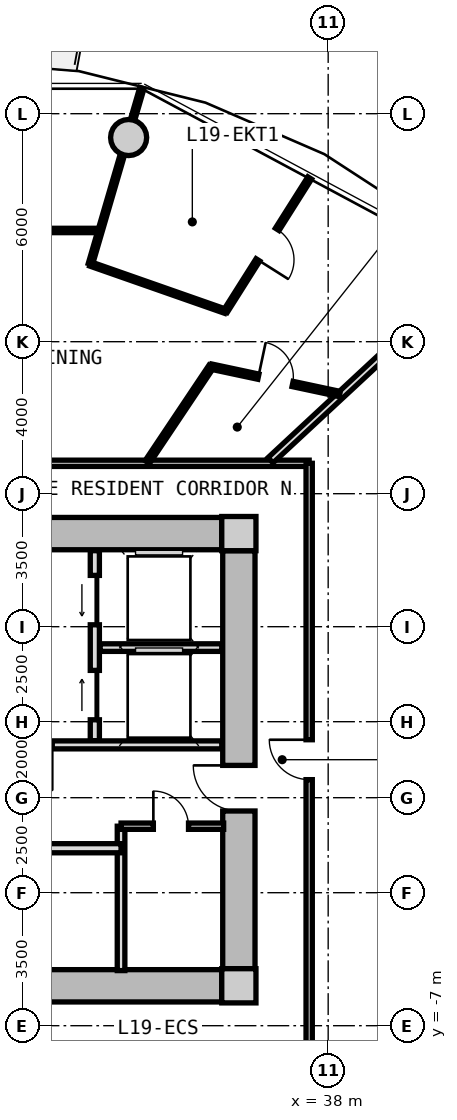
"""IFC4 building model, lengths in metres.
Left out: names, types, materials, properties, quantities, classifications, styles, units other than length and angle.
Written with IfcOpenShell. Run it as: python <this file> out.ifc"""

import sys

from ifc_helpers import new_model, si_unit, direction, frame, frame_2d, origin, origin_2d, place, context, subcontext, project, spatial, rectangle, circle, extrude, source, transform, mapped, element, fill, save


model = new_model("IFC4")
c1 = context("Model", 3, precision=1e-05, world=origin(), true_north=direction((0.0, 1.0)))
c2 = subcontext(c1, "Body", "Model", "MODEL_VIEW")
j1 = project(units=[si_unit("LENGTHUNIT", "METRE"), si_unit("PLANEANGLEUNIT", "RADIAN")], contexts=[c1])
p1 = place(None, origin())
s1 = spatial("IfcSite", under=j1, at=p1, CompositionType="ELEMENT")
p2 = place(p1, origin())
s2 = spatial("IfcBuilding", under=s1, at=p2, CompositionType="ELEMENT")
p3 = place(p2, frame((0.0, 0.0, 64.3)))
s3 = spatial("IfcBuildingStorey", under=s2, at=p3, CompositionType="ELEMENT", Elevation=64.3)
m1 = source(origin(), c2, "Body", "SweptSolid", [
    extrude(rectangle(XDim=0.9, YDim=0.9, at=origin_2d()), origin(), (0.0, 0.0, 1.0), 3.05),
])
for number, where, z_axis, x_axis in (
    (1, (35.65, -5.95, 0.0), (0.0, 0.0, 1.0), (1.0, 0.0, 0.0)),
    (2, (35.65, 5.95, 0.0), (0.0, 0.0, 1.0), (1.0, 0.0, 0.0)),
):
    element("IfcColumn", number, at=place(p3, frame(where, z_axis=z_axis, x_axis=x_axis)), inside=s3, PredefinedType="COLUMN", context=c2, shape_type="MappedRepresentation", body=[
        mapped(m1, transform((0.0, 0.0, 0.0), x_axis=(1.0, 0.0, 0.0), y_axis=(0.0, 1.0, 0.0), z_axis=(0.0, 0.0, 1.0), scale=1.0)),
    ])
m2 = source(origin(), c2, "Body", "SweptSolid", [
    extrude(rectangle(XDim=14.4, YDim=0.85, at=frame_2d((7.2, 0.0))), origin(), (0.0, 0.0, 1.0), 2.79),
])
for number, where, z_axis, x_axis in (
    (3, (20.8, 5.95, 0.0), (0.0, 0.0, 1.0), (1.0, 0.0, 0.0)),
    (4, (35.2, -5.95, 0.0), (0.0, 0.0, 1.0), (-1.0, 0.0, 0.0)),
):
    element("IfcWall", number, at=place(p3, frame(where, z_axis=z_axis, x_axis=x_axis)), inside=s3, PredefinedType="SHEAR", context=c2, shape_type="MappedRepresentation", body=[
        mapped(m2, transform((0.0, 0.0, 0.0), x_axis=(1.0, 0.0, 0.0), y_axis=(0.0, 1.0, 0.0), z_axis=(0.0, 0.0, 1.0), scale=1.0)),
    ])
m3 = source(origin(), c2, "Body", "SweptSolid", [
    extrude(rectangle(XDim=11.0, YDim=0.85, at=frame_2d((5.5, 0.0))), origin(), (0.0, 0.0, 1.0), 2.79),
])
p4 = place(p3, frame((35.65, 5.5, 0.0), z_axis=(0.0, 0.0, 1.0), x_axis=(0.0, -1.0, 0.0)))
e5 = element("IfcWall", 5, at=p4, inside=s3, PredefinedType="SHEAR", context=c2, shape_type="MappedRepresentation", body=[
    mapped(m3, transform((0.0, 0.0, 0.0), x_axis=(1.0, 0.0, 0.0), y_axis=(0.0, 1.0, 0.0), z_axis=(0.0, 0.0, 1.0), scale=1.0)),
])
p5 = place(p4, frame((5.65, 0.0, 0.0)))
e6 = element("IfcOpeningElement", 6, at=p5, cuts=e5, PredefinedType="OPENING", context=c2, shape_type="SweptSolid", body=[
    extrude(rectangle(XDim=1.2, YDim=2.15, at=frame_2d((0.6, 1.075))), frame((0.0, 0.435, 0.0), z_axis=(0.0, -1.0, 0.0), x_axis=(1.0, 0.0, 0.0)), (0.0, 0.0, 1.0), 0.87),
])
m4 = source(origin(), c2, "Body", "SweptSolid", [
    extrude(circle(Radius=0.475, at=origin_2d()), origin(), (0.0, 0.0, 1.0), 3.05),
])
p6 = place(p3, frame((32.749, 16.373, 0.0), z_axis=(0.0, 0.0, 1.0), x_axis=(1.0, 0.0, 0.0)))
e7 = element("IfcColumn", 7, at=p6, inside=s3, PredefinedType="COLUMN", context=c2, shape_type="MappedRepresentation", body=[
    mapped(m4, transform((0.0, 0.0, 0.0), x_axis=(1.0, 0.0, 0.0), y_axis=(0.0, 1.0, 0.0), z_axis=(0.0, 0.0, 1.0), scale=1.0)),
])
m5 = source(origin(), c2, "Body", "SweptSolid", [
    extrude(rectangle(XDim=5.0, YDim=0.24, at=frame_2d((2.5, 0.0))), origin(), (0.0, 0.0, 1.0), 2.775),
])
p7 = place(p3, frame((31.86, 0.5, 0.0), z_axis=(0.0, 0.0, 1.0), x_axis=(0.0, 1.0, 0.0)))
e8 = element("IfcWall", 8, at=p7, inside=s3, PredefinedType="PARTITIONING", context=c2, shape_type="MappedRepresentation", body=[
    mapped(m5, transform((0.0, 0.0, 0.0), x_axis=(1.0, 0.0, 0.0), y_axis=(0.0, 1.0, 0.0), z_axis=(0.0, 0.0, 1.0), scale=1.0)),
])
p8 = place(p7, frame((3.05, 0.0, 0.0)))
e9 = element("IfcOpeningElement", 9, at=p8, cuts=e8, PredefinedType="OPENING", context=c2, shape_type="SweptSolid", body=[
    extrude(rectangle(XDim=1.3, YDim=2.2, at=frame_2d((0.65, 1.1))), frame((0.0, 0.13, 0.0), z_axis=(0.0, -1.0, 0.0), x_axis=(1.0, 0.0, 0.0)), (0.0, 0.0, 1.0), 0.26),
])
p9 = place(p7, frame((0.55, 0.0, 0.0)))
e10 = element("IfcOpeningElement", 10, at=p9, cuts=e8, PredefinedType="OPENING", context=c2, shape_type="SweptSolid", body=[
    extrude(rectangle(XDim=1.3, YDim=2.2, at=frame_2d((0.65, 1.1))), frame((0.0, 0.13, 0.0), z_axis=(0.0, -1.0, 0.0), x_axis=(1.0, 0.0, 0.0)), (0.0, 0.0, 1.0), 0.26),
])
m6 = source(origin(), c2, "Body", "SweptSolid", [
    extrude(rectangle(XDim=3.2, YDim=0.2, at=frame_2d((1.6, 0.0))), origin(), (0.0, 0.0, 1.0), 2.775),
])
p10 = place(p3, frame((32.0, 2.95, 0.0), z_axis=(0.0, 0.0, 1.0), x_axis=(1.0, 0.0, 0.0)))
e11 = element("IfcWall", 11, at=p10, inside=s3, PredefinedType="PARTITIONING", context=c2, shape_type="MappedRepresentation", body=[
    mapped(m6, transform((0.0, 0.0, 0.0), x_axis=(1.0, 0.0, 0.0), y_axis=(0.0, 1.0, 0.0), z_axis=(0.0, 0.0, 1.0), scale=1.0)),
])
m7 = source(origin(), c2, "Body", "SweptSolid", [
    extrude(rectangle(XDim=6.66, YDim=0.21, at=frame_2d((3.33, 0.0))), origin(), (0.0, 0.0, 1.0), 2.775),
])
p11 = place(p3, frame((28.54, 0.39, 0.0), z_axis=(0.0, 0.0, 1.0), x_axis=(1.0, 0.0, 0.0)))
e12 = element("IfcWall", 12, at=p11, inside=s3, PredefinedType="PARTITIONING", context=c2, shape_type="MappedRepresentation", body=[
    mapped(m7, transform((0.0, 0.0, 0.0), x_axis=(1.0, 0.0, 0.0), y_axis=(0.0, 1.0, 0.0), z_axis=(0.0, 0.0, 1.0), scale=1.0)),
])
p12 = place(p11, frame((1.0, 0.0, 0.0)))
e13 = element("IfcOpeningElement", 13, at=p12, cuts=e12, PredefinedType="OPENING", context=c2, shape_type="SweptSolid", body=[
    extrude(rectangle(XDim=1.2, YDim=2.15, at=frame_2d((0.6, 1.075))), frame((0.0, 0.115, 0.0), z_axis=(0.0, -1.0, 0.0), x_axis=(1.0, 0.0, 0.0)), (0.0, 0.0, 1.0), 0.23),
])
m8 = source(origin(), c2, "Body", "SweptSolid", [
    extrude(rectangle(XDim=3.8, YDim=0.2, at=frame_2d((1.9, 0.0))), origin(), (0.0, 0.0, 1.0), 2.775),
])
p13 = place(p3, frame((32.55, -5.55, 0.0), z_axis=(0.0, 0.0, 1.0), x_axis=(0.0, 1.0, 0.0)))
e14 = element("IfcWall", 14, at=p13, inside=s3, PredefinedType="PARTITIONING", context=c2, shape_type="MappedRepresentation", body=[
    mapped(m8, transform((0.0, 0.0, 0.0), x_axis=(1.0, 0.0, 0.0), y_axis=(0.0, 1.0, 0.0), z_axis=(0.0, 0.0, 1.0), scale=1.0)),
])
m9 = source(origin(), c2, "Body", "SweptSolid", [
    extrude(rectangle(XDim=4.13, YDim=0.24, at=frame_2d((2.065, 0.0))), origin(), (0.0, 0.0, 1.0), 2.775),
])
p14 = place(p3, frame((28.42, -2.33, 0.0), z_axis=(0.0, 0.0, 1.0), x_axis=(1.0, 0.0, 0.0)))
e15 = element("IfcWall", 15, at=p14, inside=s3, PredefinedType="PARTITIONING", context=c2, shape_type="MappedRepresentation", body=[
    mapped(m9, transform((0.0, 0.0, 0.0), x_axis=(1.0, 0.0, 0.0), y_axis=(0.0, 1.0, 0.0), z_axis=(0.0, 0.0, 1.0), scale=1.0)),
])
m10 = source(origin(), c2, "Body", "SweptSolid", [
    extrude(rectangle(XDim=2.7, YDim=0.165, at=frame_2d((1.35, 0.0))), origin(), (0.0, 0.0, 1.0), 2.775),
])
p15 = place(p3, frame((32.55, -1.75, 0.0), z_axis=(0.0, 0.0, 1.0), x_axis=(1.0, 0.0, 0.0)))
e16 = element("IfcWall", 16, at=p15, inside=s3, PredefinedType="PARTITIONING", context=c2, shape_type="MappedRepresentation", body=[
    mapped(m10, transform((0.0, 0.0, 0.0), x_axis=(1.0, 0.0, 0.0), y_axis=(0.0, 1.0, 0.0), z_axis=(0.0, 0.0, 1.0), scale=1.0)),
])
p16 = place(p15, frame((0.85, 0.0, 0.0)))
e17 = element("IfcOpeningElement", 17, at=p16, cuts=e16, PredefinedType="OPENING", context=c2, shape_type="SweptSolid", body=[
    extrude(rectangle(XDim=0.925, YDim=2.1, at=frame_2d((0.462, 1.05))), frame((0.0, 0.093, 0.0), z_axis=(0.0, -1.0, 0.0), x_axis=(1.0, 0.0, 0.0)), (0.0, 0.0, 1.0), 0.185),
])
m11 = source(origin(), c2, "Body", "SweptSolid", [
    extrude(rectangle(XDim=19.0, YDim=0.165, at=frame_2d((9.5, 0.0))), origin(), (0.0, 0.0, 1.0), 2.775),
])
p17 = place(p3, frame((18.5, 7.8, 0.0), z_axis=(0.0, 0.0, 1.0), x_axis=(1.0, 0.0, 0.0)))
e18 = element("IfcWall", 18, at=p17, inside=s3, PredefinedType="PARTITIONING", context=c2, shape_type="MappedRepresentation", body=[
    mapped(m11, transform((0.0, 0.0, 0.0), x_axis=(1.0, 0.0, 0.0), y_axis=(0.0, 1.0, 0.0), z_axis=(0.0, 0.0, 1.0), scale=1.0)),
])
p18 = place(p17, frame((6.961, 0.0, 0.0)))
e19 = element("IfcOpeningElement", 19, at=p18, cuts=e18, PredefinedType="OPENING", context=c2, shape_type="SweptSolid", body=[
    extrude(rectangle(XDim=1.05, YDim=2.15, at=frame_2d((0.525, 1.075))), frame((0.0, 0.093, 0.0), z_axis=(0.0, -1.0, 0.0), x_axis=(1.0, 0.0, 0.0)), (0.0, 0.0, 1.0), 0.185),
])
m12 = source(origin(), c2, "Body", "SweptSolid", [
    extrude(rectangle(XDim=15.6, YDim=0.165, at=frame_2d((7.8, 0.0))), origin(), (0.0, 0.0, 1.0), 2.775),
])
p19 = place(p3, frame((37.5, 7.8, 0.0), z_axis=(0.0, 0.0, 1.0), x_axis=(0.0, -1.0, 0.0)))
e20 = element("IfcWall", 20, at=p19, inside=s3, PredefinedType="PARTITIONING", context=c2, shape_type="MappedRepresentation", body=[
    mapped(m12, transform((0.0, 0.0, 0.0), x_axis=(1.0, 0.0, 0.0), y_axis=(0.0, 1.0, 0.0), z_axis=(0.0, 0.0, 1.0), scale=1.0)),
])
p20 = place(p19, frame((7.275, 0.0, 0.0)))
e21 = element("IfcOpeningElement", 21, at=p20, cuts=e20, PredefinedType="OPENING", context=c2, shape_type="SweptSolid", body=[
    extrude(rectangle(XDim=1.05, YDim=2.15, at=frame_2d((0.525, 1.075))), frame((0.0, 0.093, 0.0), z_axis=(0.0, -1.0, 0.0), x_axis=(1.0, 0.0, 0.0)), (0.0, 0.0, 1.0), 0.185),
])
m13 = source(origin(), c2, "Body", "SweptSolid", [
    extrude(rectangle(XDim=7.435, YDim=0.19, at=frame_2d((3.717, 0.0))), origin(), (0.0, 0.0, 1.0), 2.225),
])
p21 = place(p3, frame((36.483, 7.88, 0.0), z_axis=(0.0, 0.0, 1.0), x_axis=(0.732651956848, 0.680603489652, 0.0)))
e22 = element("IfcWall", 22, at=p21, inside=s3, PredefinedType="PARTITIONING", context=c2, shape_type="MappedRepresentation", body=[
    mapped(m13, transform((0.0, 0.0, 0.0), x_axis=(1.0, 0.0, 0.0), y_axis=(0.0, 1.0, 0.0), z_axis=(0.0, 0.0, 1.0), scale=1.0)),
])
m14 = source(origin(), c2, "Body", "SweptSolid", [
    extrude(rectangle(XDim=7.993, YDim=0.115, at=frame_2d((3.996, 0.0))), origin(), (0.0, 0.0, 1.0), 2.775),
])
p22 = place(p3, frame((31.996, 13.927, 0.0), z_axis=(0.0, 0.0, 1.0), x_axis=(-1.0, 0.0, 0.0)))
e23 = element("IfcWall", 23, at=p22, inside=s3, PredefinedType="PARTITIONING", context=c2, shape_type="MappedRepresentation", body=[
    mapped(m14, transform((0.0, 0.0, 0.0), x_axis=(1.0, 0.0, 0.0), y_axis=(0.0, 1.0, 0.0), z_axis=(0.0, 0.0, 1.0), scale=1.0)),
])
p23 = place(p22, frame((3.521, 0.0, 0.0)))
e24 = element("IfcOpeningElement", 24, at=p23, cuts=e23, PredefinedType="OPENING", context=c2, shape_type="SweptSolid", body=[
    extrude(rectangle(XDim=0.95, YDim=2.1, at=frame_2d((0.475, 1.05))), frame((0.0, 0.067, 0.0), z_axis=(0.0, -1.0, 0.0), x_axis=(1.0, 0.0, 0.0)), (0.0, 0.0, 1.0), 0.135),
])
m15 = source(origin(), c2, "Body", "SweptSolid", [
    extrude(rectangle(XDim=4.829, YDim=0.115, at=frame_2d((2.415, 0.0))), origin(), (0.0, 0.0, 1.0), 2.225),
])
p24 = place(p3, frame((31.742, 13.042, 0.0), z_axis=(0.0, 0.0, 1.0), x_axis=(0.280838556456, 0.959755023539, 0.0)))
e25 = element("IfcWall", 25, at=p24, inside=s3, PredefinedType="PARTITIONING", context=c2, shape_type="MappedRepresentation", body=[
    mapped(m15, transform((0.0, 0.0, 0.0), x_axis=(1.0, 0.0, 0.0), y_axis=(0.0, 1.0, 0.0), z_axis=(0.0, 0.0, 1.0), scale=1.0)),
])
m16 = source(origin(), c2, "Body", "SweptSolid", [
    extrude(rectangle(XDim=3.025, YDim=0.14, at=frame_2d((1.513, 0.0))), origin(), (0.0, 0.0, 1.0), 2.775),
])
p25 = place(p3, frame((33.24, 7.83, 0.0), z_axis=(0.0, 0.0, 1.0), x_axis=(0.556189165904, 0.831055721195, 0.0)))
e26 = element("IfcWall", 26, at=p25, inside=s3, PredefinedType="PARTITIONING", context=c2, shape_type="MappedRepresentation", body=[
    mapped(m16, transform((0.0, 0.0, 0.0), x_axis=(1.0, 0.0, 0.0), y_axis=(0.0, 1.0, 0.0), z_axis=(0.0, 0.0, 1.0), scale=1.0)),
])
m17 = source(origin(), c2, "Body", "SweptSolid", [
    extrude(rectangle(XDim=3.459, YDim=0.14, at=frame_2d((1.729, 0.0))), origin(), (0.0, 0.0, 1.0), 2.775),
])
p26 = place(p3, frame((34.922, 10.344, 0.0), z_axis=(0.0, 0.0, 1.0), x_axis=(0.978006468578, -0.208574560815, 0.0)))
e27 = element("IfcWall", 27, at=p26, inside=s3, PredefinedType="PARTITIONING", context=c2, shape_type="MappedRepresentation", body=[
    mapped(m17, transform((0.0, 0.0, 0.0), x_axis=(1.0, 0.0, 0.0), y_axis=(0.0, 1.0, 0.0), z_axis=(0.0, 0.0, 1.0), scale=1.0)),
])
p27 = place(p26, frame((1.27, 0.0, 0.0)))
e28 = element("IfcOpeningElement", 28, at=p27, cuts=e27, PredefinedType="OPENING", context=c2, shape_type="SweptSolid", body=[
    extrude(rectangle(XDim=0.92, YDim=2.1, at=frame_2d((0.46, 1.05))), frame((0.0, 0.08, 0.0), z_axis=(0.0, -1.0, 0.0), x_axis=(1.0, 0.0, 0.0)), (0.0, 0.0, 1.0), 0.16),
])
m18 = source(origin(), c2, "Body", "SweptSolid", [
    extrude(rectangle(XDim=4.15, YDim=0.115, at=frame_2d((2.075, 0.0))), origin(), (0.0, 0.0, 1.0), 2.775),
])
p28 = place(p3, frame((35.296, 11.801, 0.0), z_axis=(0.0, 0.0, 1.0), x_axis=(0.534475378192, 0.845184045109, 0.0)))
e29 = element("IfcWall", 29, at=p28, inside=s3, PredefinedType="PARTITIONING", context=c2, shape_type="MappedRepresentation", body=[
    mapped(m18, transform((0.0, 0.0, 0.0), x_axis=(1.0, 0.0, 0.0), y_axis=(0.0, 1.0, 0.0), z_axis=(0.0, 0.0, 1.0), scale=1.0)),
])
p29 = place(p28, frame((1.6, 0.0, 0.0)))
e30 = element("IfcOpeningElement", 30, at=p29, cuts=e29, PredefinedType="OPENING", context=c2, shape_type="SweptSolid", body=[
    extrude(rectangle(XDim=0.95, YDim=2.1, at=frame_2d((0.475, 1.05))), frame((0.0, 0.067, 0.0), z_axis=(0.0, -1.0, 0.0), x_axis=(1.0, 0.0, 0.0)), (0.0, 0.0, 1.0), 0.135),
])
m19 = source(origin(), c2, "Body", "SweptSolid", [
    extrude(rectangle(XDim=3.765, YDim=0.115, at=frame_2d((1.882, 0.0))), origin(), (0.0, 0.0, 1.0), 2.775),
])
p30 = place(p3, frame((35.296, 11.801, 0.0), z_axis=(0.0, 0.0, 1.0), x_axis=(-0.943788572669, 0.330549739222, 0.0)))
e31 = element("IfcWall", 31, at=p30, inside=s3, PredefinedType="PARTITIONING", context=c2, shape_type="MappedRepresentation", body=[
    mapped(m19, transform((0.0, 0.0, 0.0), x_axis=(1.0, 0.0, 0.0), y_axis=(0.0, 1.0, 0.0), z_axis=(0.0, 0.0, 1.0), scale=1.0)),
])
m20 = source(origin(), c2, "Body", "SweptSolid", [
    extrude(rectangle(XDim=1.3, YDim=2.2, at=frame_2d((0.65, 1.1))), frame((0.0, 0.025, 0.0), z_axis=(0.0, -1.0, 0.0), x_axis=(1.0, 0.0, 0.0)), (0.0, 0.0, 1.0), 0.05),
])
p31 = place(p8, origin())
e32 = element("IfcDoor", 32, at=p31, inside=s3, OperationType="SLIDING_TO_LEFT", PredefinedType="DOOR", context=c2, shape_type="MappedRepresentation", body=[
    mapped(m20, transform((0.0, 0.0, 0.0), x_axis=(1.0, 0.0, 0.0), y_axis=(0.0, 1.0, 0.0), z_axis=(0.0, 0.0, 1.0), scale=1.0)),
])
fill(e9, e32)
p32 = place(p9, origin())
e33 = element("IfcDoor", 33, at=p32, inside=s3, OperationType="SLIDING_TO_RIGHT", PredefinedType="DOOR", context=c2, shape_type="MappedRepresentation", body=[
    mapped(m20, transform((0.0, 0.0, 0.0), x_axis=(1.0, 0.0, 0.0), y_axis=(0.0, 1.0, 0.0), z_axis=(0.0, 0.0, 1.0), scale=1.0)),
])
fill(e10, e33)
m21 = source(origin(), c2, "Body", "SweptSolid", [
    extrude(rectangle(XDim=1.2, YDim=2.15, at=frame_2d((0.6, 1.075))), frame((0.0, 0.025, 0.0), z_axis=(0.0, -1.0, 0.0), x_axis=(1.0, 0.0, 0.0)), (0.0, 0.0, 1.0), 0.05),
])
p33 = place(p5, frame((1.2, 0.0, 0.0), z_axis=(0.0, 0.0, 1.0), x_axis=(-1.0, 0.0, 0.0)))
e34 = element("IfcDoor", 34, at=p33, inside=s3, OperationType="SINGLE_SWING_RIGHT", PredefinedType="DOOR", context=c2, shape_type="MappedRepresentation", body=[
    mapped(m21, transform((0.0, 0.0, 0.0), x_axis=(1.0, 0.0, 0.0), y_axis=(0.0, 1.0, 0.0), z_axis=(0.0, 0.0, 1.0), scale=1.0)),
])
fill(e6, e34)
m22 = source(origin(), c2, "Body", "SweptSolid", [
    extrude(rectangle(XDim=0.925, YDim=2.1, at=frame_2d((0.462, 1.05))), frame((0.0, 0.025, 0.0), z_axis=(0.0, -1.0, 0.0), x_axis=(1.0, 0.0, 0.0)), (0.0, 0.0, 1.0), 0.05),
])
p34 = place(p16, origin())
e35 = element("IfcDoor", 35, at=p34, inside=s3, OperationType="SINGLE_SWING_LEFT", PredefinedType="DOOR", context=c2, shape_type="MappedRepresentation", body=[
    mapped(m22, transform((0.0, 0.0, 0.0), x_axis=(1.0, 0.0, 0.0), y_axis=(0.0, 1.0, 0.0), z_axis=(0.0, 0.0, 1.0), scale=1.0)),
])
fill(e17, e35)
m23 = source(origin(), c2, "Body", "SweptSolid", [
    extrude(rectangle(XDim=1.05, YDim=2.15, at=frame_2d((0.525, 1.075))), frame((0.0, 0.025, 0.0), z_axis=(0.0, -1.0, 0.0), x_axis=(1.0, 0.0, 0.0)), (0.0, 0.0, 1.0), 0.05),
])
p35 = place(p20, frame((1.05, 0.0, 0.0), z_axis=(0.0, 0.0, 1.0), x_axis=(-1.0, 0.0, 0.0)))
e36 = element("IfcDoor", 36, at=p35, inside=s3, OperationType="SINGLE_SWING_RIGHT", PredefinedType="DOOR", context=c2, shape_type="MappedRepresentation", body=[
    mapped(m23, transform((0.0, 0.0, 0.0), x_axis=(1.0, 0.0, 0.0), y_axis=(0.0, 1.0, 0.0), z_axis=(0.0, 0.0, 1.0), scale=1.0)),
])
fill(e21, e36)
m24 = source(origin(), c2, "Body", "SweptSolid", [
    extrude(rectangle(XDim=0.92, YDim=2.1, at=frame_2d((0.46, 1.05))), frame((0.0, 0.025, 0.0), z_axis=(0.0, -1.0, 0.0), x_axis=(1.0, 0.0, 0.0)), (0.0, 0.0, 1.0), 0.05),
])
p36 = place(p27, origin())
e37 = element("IfcDoor", 37, at=p36, inside=s3, OperationType="SINGLE_SWING_LEFT", PredefinedType="DOOR", context=c2, shape_type="MappedRepresentation", body=[
    mapped(m24, transform((0.0, 0.0, 0.0), x_axis=(1.0, 0.0, 0.0), y_axis=(0.0, 1.0, 0.0), z_axis=(0.0, 0.0, 1.0), scale=1.0)),
])
fill(e28, e37)
m25 = source(origin(), c2, "Body", "SweptSolid", [
    extrude(rectangle(XDim=0.95, YDim=2.1, at=frame_2d((0.475, 1.05))), frame((0.0, 0.025, 0.0), z_axis=(0.0, -1.0, 0.0), x_axis=(1.0, 0.0, 0.0)), (0.0, 0.0, 1.0), 0.05),
])
p37 = place(p29, frame((0.95, 0.0, 0.0), z_axis=(0.0, 0.0, 1.0), x_axis=(-1.0, 0.0, 0.0)))
e38 = element("IfcDoor", 38, at=p37, inside=s3, OperationType="SINGLE_SWING_RIGHT", PredefinedType="DOOR", context=c2, shape_type="MappedRepresentation", body=[
    mapped(m25, transform((0.0, 0.0, 0.0), x_axis=(1.0, 0.0, 0.0), y_axis=(0.0, 1.0, 0.0), z_axis=(0.0, 0.0, 1.0), scale=1.0)),
])
fill(e30, e38)
save(model, sys.argv[1])
